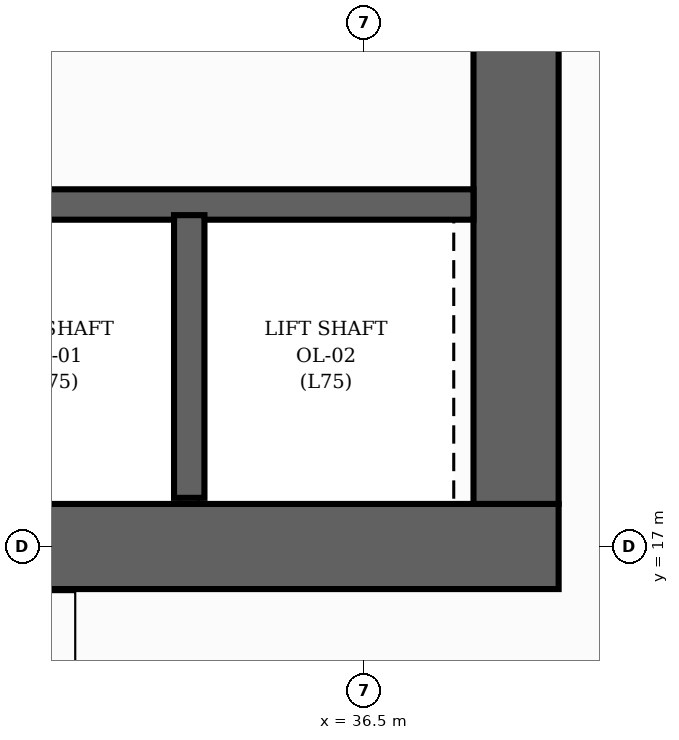
"""IFC4 building model, lengths in metres.
Left out: names, types, materials, properties, quantities, classifications, styles, units other than length and angle.
Written with IfcOpenShell. Run it as: python <this file> out.ifc"""

import sys

from ifc_helpers import new_model, si_unit, direction, frame, frame_2d, origin, place, context, subcontext, project, spatial, rectangle, extrude, element, save


model = new_model("IFC4")
c1 = context("Model", 3, precision=1e-05, world=origin(), true_north=direction((0.0, 1.0)))
c2 = subcontext(c1, "Body", "Model", "MODEL_VIEW")
j1 = project(units=[si_unit("LENGTHUNIT", "METRE"), si_unit("PLANEANGLEUNIT", "RADIAN")], contexts=[c1])
p1 = place(None, origin())
s1 = spatial("IfcSite", under=j1, at=p1, CompositionType="ELEMENT")
p2 = place(p1, origin())
s2 = spatial("IfcBuilding", under=s1, at=p2, CompositionType="ELEMENT")
p3 = place(p2, frame((0.0, 0.0, 251.04)))
s3 = spatial("IfcBuildingStorey", under=s2, at=p3, CompositionType="ELEMENT", Elevation=251.04)
p4 = place(p3, frame((26.22, 17.0, 0.0), z_axis=(0.0, 0.0, 1.0), x_axis=(1.0, 0.0, 0.0)))
e1 = element("IfcWall", 1, at=p4, inside=s3, PredefinedType="SHEAR", context=c2, shape_type="SweptSolid", body=[
    extrude(rectangle(XDim=11.56, YDim=0.56, at=frame_2d((5.78, 0.0))), origin(), (0.0, 0.0, 1.0), 4.16),
])
p5 = place(p4, frame((2.28, 0.0, 0.0)))
e2 = element("IfcOpeningElement", 2, at=p5, cuts=e1, PredefinedType="OPENING", context=c2, shape_type="SweptSolid", body=[
    extrude(rectangle(XDim=1.1, YDim=2.15, at=frame_2d((0.55, 1.075))), frame((0.0, 0.29, 0.0), z_axis=(0.0, -1.0, 0.0), x_axis=(1.0, 0.0, 0.0)), (0.0, 0.0, 1.0), 0.58),
])
p6 = place(p4, frame((5.83, 0.0, 0.0)))
e3 = element("IfcOpeningElement", 3, at=p6, cuts=e1, PredefinedType="OPENING", context=c2, shape_type="SweptSolid", body=[
    extrude(rectangle(XDim=0.9, YDim=2.1, at=frame_2d((0.45, 1.05))), frame((0.0, 0.29, 0.0), z_axis=(0.0, -1.0, 0.0), x_axis=(1.0, 0.0, 0.0)), (0.0, 0.0, 1.0), 0.58),
])
p7 = place(p3, frame((37.5, 17.28, 0.0), z_axis=(0.0, 0.0, 1.0), x_axis=(0.0, 1.0, 0.0)))
e4 = element("IfcWall", 4, at=p7, inside=s3, PredefinedType="SHEAR", context=c2, shape_type="SweptSolid", body=[
    extrude(rectangle(XDim=13.44, YDim=0.56, at=frame_2d((6.72, 0.0))), origin(), (0.0, 0.0, 1.0), 4.16),
])
p8 = place(p3, frame((33.5, 19.25, 0.0), z_axis=(0.0, 0.0, 1.0), x_axis=(1.0, 0.0, 0.0)))
e5 = element("IfcWall", 5, at=p8, inside=s3, PredefinedType="SHEAR", context=c2, shape_type="SweptSolid", body=[
    extrude(rectangle(XDim=3.72, YDim=0.2, at=frame_2d((1.86, 0.0))), origin(), (0.0, 0.0, 1.0), 4.16),
])
p9 = place(p3, frame((35.35, 17.32, 0.0), z_axis=(0.0, 0.0, 1.0), x_axis=(0.0, 1.0, 0.0)))
e6 = element("IfcWall", 6, at=p9, inside=s3, PredefinedType="SHEAR", context=c2, shape_type="SweptSolid", body=[
    extrude(rectangle(XDim=1.86, YDim=0.2, at=frame_2d((0.93, 0.0))), origin(), (0.0, 0.0, 1.0), 4.16),
])
save(model, sys.argv[1])
